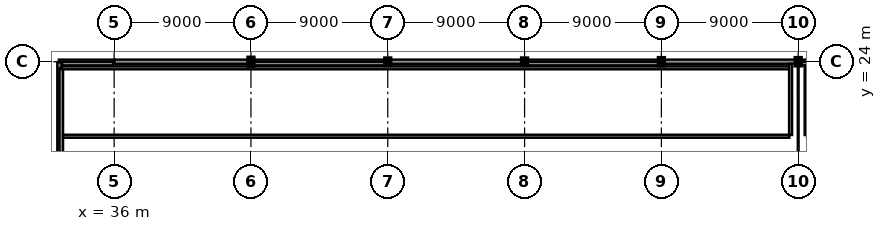
"""IFC4 building model, lengths in metres.
Left out: names, types, materials, properties, quantities, classifications, styles, units other than length and angle.
Written with IfcOpenShell. Run it as: python <this file> out.ifc"""

import sys

from ifc_helpers import new_model, si_unit, direction, frame, frame_2d, origin, origin_2d, place, context, subcontext, project, spatial, rectangle, i_section, extrude, element, fill, save


model = new_model("IFC4")
c1 = context("Model", 3, precision=1e-05, world=origin(), true_north=direction((0.0, 1.0)))
c2 = subcontext(c1, "Body", "Model", "MODEL_VIEW")
j1 = project(units=[si_unit("LENGTHUNIT", "METRE"), si_unit("PLANEANGLEUNIT", "RADIAN")], contexts=[c1])
p1 = place(None, origin())
s1 = spatial("IfcSite", under=j1, at=p1, CompositionType="ELEMENT")
p2 = place(p1, origin())
s2 = spatial("IfcBuilding", under=s1, at=p2, CompositionType="ELEMENT")
p3 = place(p2, frame((0.0, 0.0, 35.4)))
s3 = spatial("IfcBuildingStorey", under=s2, at=p3, CompositionType="ELEMENT", Elevation=35.4)
p4 = place(p3, frame((45.0, 24.0, 0.0), z_axis=(0.0, 0.0, 1.0), x_axis=(1.0, 0.0, 0.0)))
e1 = element("IfcColumn", 1, at=p4, inside=s3, PredefinedType="COLUMN", context=c2, shape_type="SweptSolid", body=[
    extrude(i_section(OverallWidth=0.3, OverallDepth=0.5, WebThickness=0.014, FlangeThickness=0.028, at=origin_2d()), origin(), (0.0, 0.0, 1.0), 3.8),
])
for number, where, z_axis, x_axis in (
    (2, (54.0, 24.0, 0.0), (0.0, 0.0, 1.0), (0.0, 1.0, 0.0)),
    (3, (63.0, 24.0, 0.0), (0.0, 0.0, 1.0), (1.0, 0.0, 0.0)),
):
    element("IfcColumn", number, at=place(p3, frame(where, z_axis=z_axis, x_axis=x_axis)), inside=s3, PredefinedType="COLUMN", context=c2, shape_type="SweptSolid", body=[
        extrude(i_section(OverallWidth=0.3, OverallDepth=0.4, WebThickness=0.013, FlangeThickness=0.024, at=origin_2d()), origin(), (0.0, 0.0, 1.0), 3.8),
    ])
for number, where, z_axis, x_axis in (
    (4, (72.0, 24.0, 0.0), (0.0, 0.0, 1.0), (1.0, 0.0, 0.0)),
    (5, (81.0, 24.0, 0.0), (0.0, 0.0, 1.0), (1.0, 0.0, 0.0)),
):
    element("IfcColumn", number, at=place(p3, frame(where, z_axis=z_axis, x_axis=x_axis)), inside=s3, PredefinedType="COLUMN", context=c2, shape_type="SweptSolid", body=[
        extrude(i_section(OverallWidth=0.3, OverallDepth=0.45, WebThickness=0.014, FlangeThickness=0.026, at=origin_2d()), origin(), (0.0, 0.0, 1.0), 3.8),
    ])
p5 = place(p3, frame((80.942, 24.0, 0.0), z_axis=(0.0, 0.0, 1.0), x_axis=(-1.0, 0.0, 0.0)))
e6 = element("IfcWall", 6, at=p5, inside=s3, PredefinedType="SOLIDWALL", context=c2, shape_type="SweptSolid", body=[
    extrude(rectangle(XDim=8.934, YDim=0.28, at=frame_2d((4.467, 0.0))), origin(), (0.0, 0.0, 1.0), 3.205),
])
p6 = place(p5, frame((2.03, 0.0, 1.05)))
e7 = element("IfcOpeningElement", 7, at=p6, cuts=e6, PredefinedType="OPENING", context=c2, shape_type="SweptSolid", body=[
    extrude(rectangle(XDim=1.3, YDim=1.3, at=frame_2d((0.65, 0.65))), frame((0.0, 0.155, 0.0), z_axis=(0.0, -1.0, 0.0), x_axis=(1.0, 0.0, 0.0)), (0.0, 0.0, 1.0), 0.31),
])
p7 = place(p5, frame((5.604, 0.0, 1.05)))
e8 = element("IfcOpeningElement", 8, at=p7, cuts=e6, PredefinedType="OPENING", context=c2, shape_type="SweptSolid", body=[
    extrude(rectangle(XDim=1.3, YDim=1.3, at=frame_2d((0.65, 0.65))), frame((0.0, 0.155, 0.0), z_axis=(0.0, -1.0, 0.0), x_axis=(1.0, 0.0, 0.0)), (0.0, 0.0, 1.0), 0.31),
])
p8 = place(p3, frame((71.992, 24.0, 0.0), z_axis=(0.0, 0.0, 1.0), x_axis=(-1.0, 0.0, 0.0)))
e9 = element("IfcWall", 9, at=p8, inside=s3, PredefinedType="SOLIDWALL", context=c2, shape_type="SweptSolid", body=[
    extrude(rectangle(XDim=8.984, YDim=0.28, at=frame_2d((4.492, 0.0))), origin(), (0.0, 0.0, 1.0), 2.787),
])
p9 = place(p8, frame((2.045, 0.0, 1.05)))
e10 = element("IfcOpeningElement", 10, at=p9, cuts=e9, PredefinedType="OPENING", context=c2, shape_type="SweptSolid", body=[
    extrude(rectangle(XDim=1.3, YDim=1.3, at=frame_2d((0.65, 0.65))), frame((0.0, 0.155, 0.0), z_axis=(0.0, -1.0, 0.0), x_axis=(1.0, 0.0, 0.0)), (0.0, 0.0, 1.0), 0.31),
])
p10 = place(p8, frame((5.639, 0.0, 1.05)))
e11 = element("IfcOpeningElement", 11, at=p10, cuts=e9, PredefinedType="OPENING", context=c2, shape_type="SweptSolid", body=[
    extrude(rectangle(XDim=1.3, YDim=1.3, at=frame_2d((0.65, 0.65))), frame((0.0, 0.155, 0.0), z_axis=(0.0, -1.0, 0.0), x_axis=(1.0, 0.0, 0.0)), (0.0, 0.0, 1.0), 0.31),
])
p11 = place(p3, frame((62.992, 24.0, 0.0), z_axis=(0.0, 0.0, 1.0), x_axis=(-1.0, 0.0, 0.0)))
e12 = element("IfcWall", 12, at=p11, inside=s3, PredefinedType="SOLIDWALL", context=c2, shape_type="SweptSolid", body=[
    extrude(rectangle(XDim=8.794, YDim=0.28, at=frame_2d((4.397, 0.0))), origin(), (0.0, 0.0, 1.0), 2.787),
])
p12 = place(p11, frame((1.988, 0.0, 1.05)))
e13 = element("IfcOpeningElement", 13, at=p12, cuts=e12, PredefinedType="OPENING", context=c2, shape_type="SweptSolid", body=[
    extrude(rectangle(XDim=1.3, YDim=1.3, at=frame_2d((0.65, 0.65))), frame((0.0, 0.155, 0.0), z_axis=(0.0, -1.0, 0.0), x_axis=(1.0, 0.0, 0.0)), (0.0, 0.0, 1.0), 0.31),
])
p13 = place(p11, frame((5.506, 0.0, 1.05)))
e14 = element("IfcOpeningElement", 14, at=p13, cuts=e12, PredefinedType="OPENING", context=c2, shape_type="SweptSolid", body=[
    extrude(rectangle(XDim=1.3, YDim=1.3, at=frame_2d((0.65, 0.65))), frame((0.0, 0.155, 0.0), z_axis=(0.0, -1.0, 0.0), x_axis=(1.0, 0.0, 0.0)), (0.0, 0.0, 1.0), 0.31),
])
p14 = place(p3, frame((53.802, 24.0, 0.0), z_axis=(0.0, 0.0, 1.0), x_axis=(-1.0, 0.0, 0.0)))
e15 = element("IfcWall", 15, at=p14, inside=s3, PredefinedType="SOLIDWALL", context=c2, shape_type="SweptSolid", body=[
    extrude(rectangle(XDim=8.794, YDim=0.28, at=frame_2d((4.397, 0.0))), origin(), (0.0, 0.0, 1.0), 2.787),
])
p15 = place(p14, frame((1.988, 0.0, 1.05)))
e16 = element("IfcOpeningElement", 16, at=p15, cuts=e15, PredefinedType="OPENING", context=c2, shape_type="SweptSolid", body=[
    extrude(rectangle(XDim=1.3, YDim=1.3, at=frame_2d((0.65, 0.65))), frame((0.0, 0.155, 0.0), z_axis=(0.0, -1.0, 0.0), x_axis=(1.0, 0.0, 0.0)), (0.0, 0.0, 1.0), 0.31),
])
p16 = place(p14, frame((5.506, 0.0, 1.05)))
e17 = element("IfcOpeningElement", 17, at=p16, cuts=e15, PredefinedType="OPENING", context=c2, shape_type="SweptSolid", body=[
    extrude(rectangle(XDim=1.3, YDim=1.3, at=frame_2d((0.65, 0.65))), frame((0.0, 0.155, 0.0), z_axis=(0.0, -1.0, 0.0), x_axis=(1.0, 0.0, 0.0)), (0.0, 0.0, 1.0), 0.31),
])
p17 = place(p3, frame((44.992, 24.0, 0.0), z_axis=(0.0, 0.0, 1.0), x_axis=(-1.0, 0.0, 0.0)))
e18 = element("IfcWall", 18, at=p17, inside=s3, PredefinedType="SOLIDWALL", context=c2, shape_type="SweptSolid", body=[
    extrude(rectangle(XDim=9.002, YDim=0.28, at=frame_2d((4.501, 0.0))), origin(), (0.0, 0.0, 1.0), 2.787),
])
p18 = place(p3, frame((36.01, 24.0, 0.0), z_axis=(0.0, 0.0, 1.0), x_axis=(-1.0, 0.0, 0.0)))
e19 = element("IfcWall", 19, at=p18, inside=s3, PredefinedType="SOLIDWALL", context=c2, shape_type="SweptSolid", body=[
    extrude(rectangle(XDim=3.65, YDim=0.28, at=frame_2d((1.825, 0.0))), origin(), (0.0, 0.0, 1.0), 2.787),
])
p19 = place(p3, frame((32.4, 23.96, 0.0), z_axis=(0.0, 0.0, 1.0), x_axis=(0.0, -1.0, 0.0)))
e20 = element("IfcWall", 20, at=p19, inside=s3, PredefinedType="SOLIDWALL", context=c2, shape_type="SweptSolid", body=[
    extrude(rectangle(XDim=11.97, YDim=0.28, at=frame_2d((5.985, 0.0))), origin(), (0.0, 0.0, 1.0), 3.095),
])
p20 = place(p19, frame((2.941, 0.0, 1.05)))
e21 = element("IfcOpeningElement", 21, at=p20, cuts=e20, PredefinedType="OPENING", context=c2, shape_type="SweptSolid", body=[
    extrude(rectangle(XDim=1.3, YDim=1.3, at=frame_2d((0.65, 0.65))), frame((0.0, 0.155, 0.0), z_axis=(0.0, -1.0, 0.0), x_axis=(1.0, 0.0, 0.0)), (0.0, 0.0, 1.0), 0.31),
])
p21 = place(p19, frame((8.5, 0.0, 1.05)))
e22 = element("IfcOpeningElement", 22, at=p21, cuts=e20, PredefinedType="OPENING", context=c2, shape_type="SweptSolid", body=[
    extrude(rectangle(XDim=1.3, YDim=1.3, at=frame_2d((0.65, 0.65))), frame((0.0, 0.155, 0.0), z_axis=(0.0, -1.0, 0.0), x_axis=(1.0, 0.0, 0.0)), (0.0, 0.0, 1.0), 0.31),
])
p22 = place(p3, frame((89.992, 24.0, 0.0), z_axis=(0.0, 0.0, 1.0), x_axis=(-1.0, 0.0, 0.0)))
e23 = element("IfcWall", 23, at=p22, inside=s3, PredefinedType="SOLIDWALL", context=c2, shape_type="SweptSolid", body=[
    extrude(rectangle(XDim=8.934, YDim=0.28, at=frame_2d((4.467, 0.0))), origin(), (0.0, 0.0, 1.0), 3.205),
])
p23 = place(p22, frame((2.03, 0.0, 1.05)))
e24 = element("IfcOpeningElement", 24, at=p23, cuts=e23, PredefinedType="OPENING", context=c2, shape_type="SweptSolid", body=[
    extrude(rectangle(XDim=1.3, YDim=1.3, at=frame_2d((0.65, 0.65))), frame((0.0, 0.155, 0.0), z_axis=(0.0, -1.0, 0.0), x_axis=(1.0, 0.0, 0.0)), (0.0, 0.0, 1.0), 0.31),
])
p24 = place(p22, frame((5.604, 0.0, 1.05)))
e25 = element("IfcOpeningElement", 25, at=p24, cuts=e23, PredefinedType="OPENING", context=c2, shape_type="SweptSolid", body=[
    extrude(rectangle(XDim=1.3, YDim=1.3, at=frame_2d((0.65, 0.65))), frame((0.0, 0.155, 0.0), z_axis=(0.0, -1.0, 0.0), x_axis=(1.0, 0.0, 0.0)), (0.0, 0.0, 1.0), 0.31),
])
for number, where, z_axis, x_axis in (
    (26, (89.94, 23.88, 3.8), (0.0, 0.0, 1.0), (-1.0, 0.0, 0.0)),
    (27, (71.94, 23.88, 3.8), (0.0, 0.0, 1.0), (-1.0, 0.0, 0.0)),
    (28, (53.94, 23.88, 3.8), (0.0, 0.0, 1.0), (-1.0, 0.0, 0.0)),
):
    element("IfcWall", number, at=place(p3, frame(where, z_axis=z_axis, x_axis=x_axis)), inside=s3, PredefinedType="PARAPET", context=c2, shape_type="SweptSolid", body=[
        extrude(rectangle(XDim=8.88, YDim=0.24, at=frame_2d((4.44, 0.0))), origin(), (0.0, 0.0, 1.0), 1.1),
    ])
p25 = place(p3, frame((35.94, 23.88, 3.8), z_axis=(0.0, 0.0, 1.0), x_axis=(-1.0, 0.0, 0.0)))
e29 = element("IfcWall", 29, at=p25, inside=s3, PredefinedType="PARAPET", context=c2, shape_type="SweptSolid", body=[
    extrude(rectangle(XDim=3.36, YDim=0.24, at=frame_2d((1.68, 0.0))), origin(), (0.0, 0.0, 1.0), 1.1),
])
p26 = place(p3, frame((32.52, 23.58, 3.8), z_axis=(0.0, 0.0, 1.0), x_axis=(0.0, -1.0, 0.0)))
e30 = element("IfcWall", 30, at=p26, inside=s3, PredefinedType="PARAPET", context=c2, shape_type="SweptSolid", body=[
    extrude(rectangle(XDim=11.52, YDim=0.24, at=frame_2d((5.76, 0.0))), origin(), (0.0, 0.0, 1.0), 1.1),
])
p27 = place(p3, frame((32.535, 23.6, 0.0), z_axis=(0.0, 0.0, 1.0), x_axis=(1.0, 0.0, 0.0)))
e31 = element("IfcWall", 31, at=p27, inside=s3, PredefinedType="PARTITIONING", context=c2, shape_type="SweptSolid", body=[
    extrude(rectangle(XDim=47.885, YDim=0.2, at=frame_2d((23.942, 0.0))), origin(), (0.0, 0.0, 1.0), 3.64),
])
p28 = place(p3, frame((80.5, 23.865, 0.0), z_axis=(0.0, 0.0, 1.0), x_axis=(0.0, -1.0, 0.0)))
e32 = element("IfcWall", 32, at=p28, inside=s3, PredefinedType="PARTITIONING", context=c2, shape_type="SweptSolid", body=[
    extrude(rectangle(XDim=4.685, YDim=0.2, at=frame_2d((2.343, 0.0))), origin(), (0.0, 0.0, 1.0), 3.315),
])
p29 = place(p3, frame((80.42, 19.1, 0.0), z_axis=(0.0, 0.0, 1.0), x_axis=(-1.0, 0.0, 0.0)))
e33 = element("IfcWall", 33, at=p29, inside=s3, PredefinedType="PARTITIONING", context=c2, shape_type="SweptSolid", body=[
    extrude(rectangle(XDim=47.785, YDim=0.2, at=frame_2d((23.893, 0.0))), origin(), (0.0, 0.0, 1.0), 3.64),
])
p30 = place(p29, frame((23.042, 0.0, 0.0)))
e34 = element("IfcOpeningElement", 34, at=p30, cuts=e33, PredefinedType="OPENING", context=c2, shape_type="SweptSolid", body=[
    extrude(rectangle(XDim=1.7, YDim=2.4, at=frame_2d((0.85, 1.2))), frame((0.0, 0.115, 0.0), z_axis=(0.0, -1.0, 0.0), x_axis=(1.0, 0.0, 0.0)), (0.0, 0.0, 1.0), 0.23),
])
p31 = place(p3, frame((81.5, 19.18, 0.0), z_axis=(0.0, 0.0, 1.0), x_axis=(0.0, 1.0, 0.0)))
e35 = element("IfcWall", 35, at=p31, inside=s3, PredefinedType="PARTITIONING", context=c2, shape_type="SweptSolid", body=[
    extrude(rectangle(XDim=4.585, YDim=0.15, at=frame_2d((2.292, 0.0))), origin(), (0.0, 0.0, 1.0), 3.315),
])
p32 = place(p6, origin())
e36 = element("IfcWindow", 36, at=p32, inside=s3, PartitioningType="SINGLE_PANEL", PredefinedType="WINDOW", context=c2, shape_type="SweptSolid", body=[
    extrude(rectangle(XDim=1.3, YDim=1.3, at=frame_2d((0.65, 0.65))), frame((0.0, 0.03, 0.0), z_axis=(0.0, -1.0, 0.0), x_axis=(1.0, 0.0, 0.0)), (0.0, 0.0, 1.0), 0.06),
])
fill(e7, e36)
p33 = place(p7, origin())
e37 = element("IfcWindow", 37, at=p33, inside=s3, PartitioningType="SINGLE_PANEL", PredefinedType="WINDOW", context=c2, shape_type="SweptSolid", body=[
    extrude(rectangle(XDim=1.3, YDim=1.3, at=frame_2d((0.65, 0.65))), frame((0.0, 0.03, 0.0), z_axis=(0.0, -1.0, 0.0), x_axis=(1.0, 0.0, 0.0)), (0.0, 0.0, 1.0), 0.06),
])
fill(e8, e37)
p34 = place(p9, origin())
e38 = element("IfcWindow", 38, at=p34, inside=s3, PartitioningType="SINGLE_PANEL", PredefinedType="WINDOW", context=c2, shape_type="SweptSolid", body=[
    extrude(rectangle(XDim=1.3, YDim=1.3, at=frame_2d((0.65, 0.65))), frame((0.0, 0.03, 0.0), z_axis=(0.0, -1.0, 0.0), x_axis=(1.0, 0.0, 0.0)), (0.0, 0.0, 1.0), 0.06),
])
fill(e10, e38)
p35 = place(p10, origin())
e39 = element("IfcWindow", 39, at=p35, inside=s3, PartitioningType="SINGLE_PANEL", PredefinedType="WINDOW", context=c2, shape_type="SweptSolid", body=[
    extrude(rectangle(XDim=1.3, YDim=1.3, at=frame_2d((0.65, 0.65))), frame((0.0, 0.03, 0.0), z_axis=(0.0, -1.0, 0.0), x_axis=(1.0, 0.0, 0.0)), (0.0, 0.0, 1.0), 0.06),
])
fill(e11, e39)
p36 = place(p12, origin())
e40 = element("IfcWindow", 40, at=p36, inside=s3, PartitioningType="SINGLE_PANEL", PredefinedType="WINDOW", context=c2, shape_type="SweptSolid", body=[
    extrude(rectangle(XDim=1.3, YDim=1.3, at=frame_2d((0.65, 0.65))), frame((0.0, 0.03, 0.0), z_axis=(0.0, -1.0, 0.0), x_axis=(1.0, 0.0, 0.0)), (0.0, 0.0, 1.0), 0.06),
])
fill(e13, e40)
p37 = place(p13, origin())
e41 = element("IfcWindow", 41, at=p37, inside=s3, PartitioningType="SINGLE_PANEL", PredefinedType="WINDOW", context=c2, shape_type="SweptSolid", body=[
    extrude(rectangle(XDim=1.3, YDim=1.3, at=frame_2d((0.65, 0.65))), frame((0.0, 0.03, 0.0), z_axis=(0.0, -1.0, 0.0), x_axis=(1.0, 0.0, 0.0)), (0.0, 0.0, 1.0), 0.06),
])
fill(e14, e41)
p38 = place(p15, origin())
e42 = element("IfcWindow", 42, at=p38, inside=s3, PartitioningType="SINGLE_PANEL", PredefinedType="WINDOW", context=c2, shape_type="SweptSolid", body=[
    extrude(rectangle(XDim=1.3, YDim=1.3, at=frame_2d((0.65, 0.65))), frame((0.0, 0.03, 0.0), z_axis=(0.0, -1.0, 0.0), x_axis=(1.0, 0.0, 0.0)), (0.0, 0.0, 1.0), 0.06),
])
fill(e16, e42)
p39 = place(p16, origin())
e43 = element("IfcWindow", 43, at=p39, inside=s3, PartitioningType="SINGLE_PANEL", PredefinedType="WINDOW", context=c2, shape_type="SweptSolid", body=[
    extrude(rectangle(XDim=1.3, YDim=1.3, at=frame_2d((0.65, 0.65))), frame((0.0, 0.03, 0.0), z_axis=(0.0, -1.0, 0.0), x_axis=(1.0, 0.0, 0.0)), (0.0, 0.0, 1.0), 0.06),
])
fill(e17, e43)
p40 = place(p20, origin())
e44 = element("IfcWindow", 44, at=p40, inside=s3, PartitioningType="SINGLE_PANEL", PredefinedType="WINDOW", context=c2, shape_type="SweptSolid", body=[
    extrude(rectangle(XDim=1.3, YDim=1.3, at=frame_2d((0.65, 0.65))), frame((0.0, 0.03, 0.0), z_axis=(0.0, -1.0, 0.0), x_axis=(1.0, 0.0, 0.0)), (0.0, 0.0, 1.0), 0.06),
])
fill(e21, e44)
p41 = place(p30, origin())
e45 = element("IfcDoor", 45, at=p41, inside=s3, OperationType="DOUBLE_DOOR_SINGLE_SWING", PredefinedType="DOOR", context=c2, shape_type="SweptSolid", body=[
    extrude(rectangle(XDim=1.7, YDim=2.4, at=frame_2d((0.85, 1.2))), frame((0.0, 0.025, 0.0), z_axis=(0.0, -1.0, 0.0), x_axis=(1.0, 0.0, 0.0)), (0.0, 0.0, 1.0), 0.05),
])
fill(e34, e45)
save(model, sys.argv[1])
